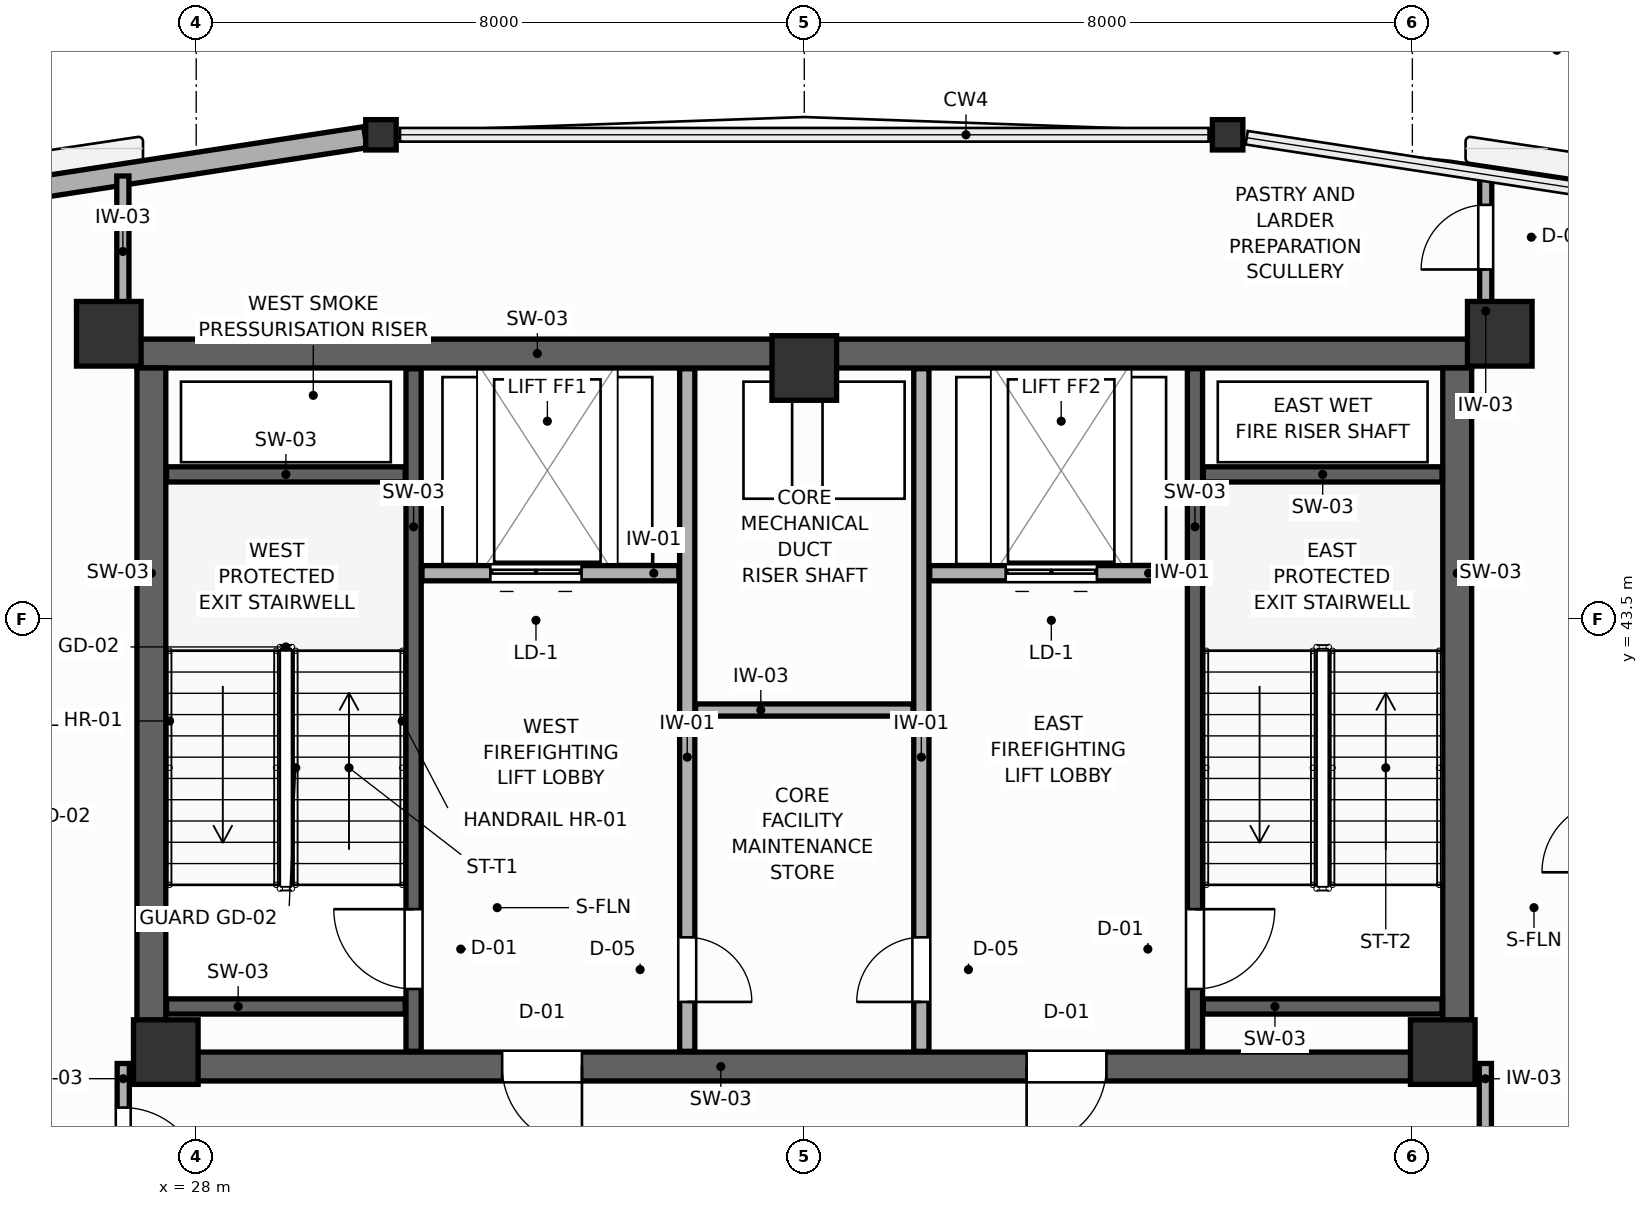
"""IFC4 building model, lengths in metres.
Left out: names, types, materials, properties, quantities, classifications, styles, units other than length and angle.
Written with IfcOpenShell. Run it as: python <this file> out.ifc"""

import sys

from ifc_helpers import new_model, si_unit, direction, frame, frame_2d, origin, origin_2d, place, context, subcontext, project, spatial, rectangle, i_section, extrude, source, transform, mapped, element, fill, save


model = new_model("IFC4")
c1 = context("Model", 3, precision=1e-05, world=origin(), true_north=direction((0.0, 1.0)))
c2 = subcontext(c1, "Body", "Model", "MODEL_VIEW")
j1 = project(units=[si_unit("LENGTHUNIT", "METRE"), si_unit("PLANEANGLEUNIT", "RADIAN")], contexts=[c1])
p1 = place(None, origin())
s1 = spatial("IfcSite", under=j1, at=p1, CompositionType="ELEMENT")
p2 = place(p1, origin())
s2 = spatial("IfcBuilding", under=s1, at=p2, CompositionType="ELEMENT")
p3 = place(p2, frame((0.0, 0.0, 279.6)))
s3 = spatial("IfcBuildingStorey", under=s2, at=p3, CompositionType="ELEMENT", Elevation=279.6)
p4 = place(p3, frame((27.22, 46.99, 0.0), z_axis=(0.0, 0.0, 1.0), x_axis=(1.0, 0.0, 0.0)))
e1 = element("IfcWall", 1, at=p4, inside=s3, PredefinedType="SHEAR", context=c2, shape_type="SweptSolid", body=[
    extrude(rectangle(XDim=17.56, YDim=0.38, at=frame_2d((8.78, 0.0))), origin(), (0.0, 0.0, 1.0), 4.2),
])
p5 = place(p3, frame((27.22, 37.61, 0.0), z_axis=(0.0, 0.0, 1.0), x_axis=(1.0, 0.0, 0.0)))
e2 = element("IfcWall", 2, at=p5, inside=s3, PredefinedType="SHEAR", context=c2, shape_type="SweptSolid", body=[
    extrude(rectangle(XDim=17.56, YDim=0.38, at=frame_2d((8.78, 0.0))), origin(), (0.0, 0.0, 1.0), 4.2),
])
p6 = place(p5, frame((4.805, 0.0, 0.0)))
e3 = element("IfcOpeningElement", 3, at=p6, cuts=e2, PredefinedType="OPENING", context=c2, shape_type="SweptSolid", body=[
    extrude(rectangle(XDim=1.05, YDim=2.1, at=frame_2d((0.525, 1.05))), frame((0.0, 0.2, 0.0), z_axis=(0.0, -1.0, 0.0), x_axis=(1.0, 0.0, 0.0)), (0.0, 0.0, 1.0), 0.4),
])
p7 = place(p5, frame((11.705, 0.0, 0.0)))
e4 = element("IfcOpeningElement", 4, at=p7, cuts=e2, PredefinedType="OPENING", context=c2, shape_type="SweptSolid", body=[
    extrude(rectangle(XDim=1.05, YDim=2.1, at=frame_2d((0.525, 1.05))), frame((0.0, 0.2, 0.0), z_axis=(0.0, -1.0, 0.0), x_axis=(1.0, 0.0, 0.0)), (0.0, 0.0, 1.0), 0.4),
])
for number, where, z_axis, x_axis in (
    (5, (27.41, 37.8, 0.0), (0.0, 0.0, 1.0), (0.0, 1.0, 0.0)),
    (6, (44.59, 37.8, 0.0), (0.0, 0.0, 1.0), (0.0, 1.0, 0.0)),
):
    element("IfcWall", number, at=place(p3, frame(where, z_axis=z_axis, x_axis=x_axis)), inside=s3, PredefinedType="SHEAR", context=c2, shape_type="SweptSolid", body=[
        extrude(rectangle(XDim=9.0, YDim=0.38, at=frame_2d((4.5, 0.0))), origin(), (0.0, 0.0, 1.0), 4.2),
    ])
m1 = source(origin(), c2, "Body", "SweptSolid", [
    extrude(rectangle(XDim=0.85, YDim=0.85, at=origin_2d()), origin(), (0.0, 0.0, 1.0), 4.2),
])
for number, where, z_axis, x_axis in (
    (7, (26.85, 47.25, 0.0), (0.0, 0.0, 1.0), (1.0, 0.0, 0.0)),
    (8, (45.15, 47.25, 0.0), (0.0, 0.0, 1.0), (1.0, 0.0, 0.0)),
    (9, (27.6, 37.8, 0.0), (0.0, 0.0, 1.0), (1.0, 0.0, 0.0)),
    (10, (44.4, 37.8, 0.0), (0.0, 0.0, 1.0), (1.0, 0.0, 0.0)),
    (11, (36.0, 46.8, 0.0), (0.0, 0.0, 1.0), (1.0, 0.0, 0.0)),
):
    element("IfcColumn", number, at=place(p3, frame(where, z_axis=z_axis, x_axis=x_axis)), inside=s3, PredefinedType="COLUMN", context=c2, shape_type="MappedRepresentation", body=[
        mapped(m1, transform((0.0, 0.0, 0.0), scale=1.0)),
    ])
m2 = source(origin(), c2, "Body", "SweptSolid", [
    extrude(i_section(OverallWidth=0.401, OverallDepth=0.399, WebThickness=0.022, FlangeThickness=0.036, FilletRadius=0.015, at=origin_2d()), origin(), (0.0, 0.0, 1.0), 4.2),
])
for number, where, z_axis, x_axis in (
    (12, (41.57, 49.868, 0.0), (0.0, 0.0, 1.0), (1.0, 0.0, 0.0)),
    (13, (30.43, 49.868, 0.0), (0.0, 0.0, 1.0), (1.0, 0.0, 0.0)),
):
    element("IfcColumn", number, at=place(p3, frame(where, z_axis=z_axis, x_axis=x_axis)), inside=s3, PredefinedType="COLUMN", context=c2, shape_type="MappedRepresentation", body=[
        mapped(m2, transform((0.0, 0.0, 0.0), scale=1.0)),
    ])
p8 = place(p3, frame((30.225, 49.836, 0.0), z_axis=(0.0, 0.0, 1.0), x_axis=(-0.988391650679, -0.151927432902, 0.0)))
e14 = element("IfcWall", 14, at=p8, inside=s3, PredefinedType="SOLIDWALL", context=c2, shape_type="SweptSolid", body=[
    extrude(rectangle(XDim=12.301, YDim=0.28, at=frame_2d((6.151, 0.0))), origin(), (0.0, 0.0, 1.0), 2.52),
])
p9 = place(p3, frame((30.86, 37.81, 0.0), z_axis=(0.0, 0.0, 1.0), x_axis=(0.0, 1.0, 0.0)))
e15 = element("IfcWall", 15, at=p9, inside=s3, PredefinedType="SHEAR", context=c2, shape_type="SweptSolid", body=[
    extrude(rectangle(XDim=8.98, YDim=0.2, at=frame_2d((4.49, 0.0))), origin(), (0.0, 0.0, 1.0), 4.2),
])
p10 = place(p9, frame((0.82, 0.0, 0.0)))
e16 = element("IfcOpeningElement", 16, at=p10, cuts=e15, PredefinedType="OPENING", context=c2, shape_type="SweptSolid", body=[
    extrude(rectangle(XDim=1.05, YDim=2.1, at=frame_2d((0.525, 1.05))), frame((0.0, 0.11, 0.0), z_axis=(0.0, -1.0, 0.0), x_axis=(1.0, 0.0, 0.0)), (0.0, 0.0, 1.0), 0.22),
])
for number, where, z_axis, x_axis in (
    (17, (27.61, 45.4, 0.0), (0.0, 0.0, 1.0), (1.0, 0.0, 0.0)),
    (18, (27.61, 38.4, 0.0), (0.0, 0.0, 1.0), (1.0, 0.0, 0.0)),
):
    element("IfcWall", number, at=place(p3, frame(where, z_axis=z_axis, x_axis=x_axis)), inside=s3, PredefinedType="SHEAR", context=c2, shape_type="SweptSolid", body=[
        extrude(rectangle(XDim=3.14, YDim=0.2, at=frame_2d((1.57, 0.0))), origin(), (0.0, 0.0, 1.0), 4.2),
    ])
p11 = place(p3, frame((41.14, 37.81, 0.0), z_axis=(0.0, 0.0, 1.0), x_axis=(0.0, 1.0, 0.0)))
e19 = element("IfcWall", 19, at=p11, inside=s3, PredefinedType="SHEAR", context=c2, shape_type="SweptSolid", body=[
    extrude(rectangle(XDim=8.98, YDim=0.2, at=frame_2d((4.49, 0.0))), origin(), (0.0, 0.0, 1.0), 4.2),
])
p12 = place(p11, frame((0.82, 0.0, 0.0)))
e20 = element("IfcOpeningElement", 20, at=p12, cuts=e19, PredefinedType="OPENING", context=c2, shape_type="SweptSolid", body=[
    extrude(rectangle(XDim=1.05, YDim=2.1, at=frame_2d((0.525, 1.05))), frame((0.0, 0.11, 0.0), z_axis=(0.0, -1.0, 0.0), x_axis=(1.0, 0.0, 0.0)), (0.0, 0.0, 1.0), 0.22),
])
for number, where, z_axis, x_axis in (
    (21, (41.25, 45.4, 0.0), (0.0, 0.0, 1.0), (1.0, 0.0, 0.0)),
    (22, (41.25, 38.4, 0.0), (0.0, 0.0, 1.0), (1.0, 0.0, 0.0)),
):
    element("IfcWall", number, at=place(p3, frame(where, z_axis=z_axis, x_axis=x_axis)), inside=s3, PredefinedType="SHEAR", context=c2, shape_type="SweptSolid", body=[
        extrude(rectangle(XDim=3.14, YDim=0.2, at=frame_2d((1.57, 0.0))), origin(), (0.0, 0.0, 1.0), 4.2),
    ])
p13 = place(p3, frame((30.97, 44.1, 0.0), z_axis=(0.0, 0.0, 1.0), x_axis=(1.0, 0.0, 0.0)))
e23 = element("IfcWall", 23, at=p13, inside=s3, PredefinedType="PARTITIONING", context=c2, shape_type="SweptSolid", body=[
    extrude(rectangle(XDim=3.38, YDim=0.2, at=frame_2d((1.69, 0.0))), origin(), (0.0, 0.0, 1.0), 3.96),
])
p14 = place(p13, frame((0.9, 0.0, 0.0)))
e24 = element("IfcOpeningElement", 24, at=p14, cuts=e23, PredefinedType="OPENING", context=c2, shape_type="SweptSolid", body=[
    extrude(rectangle(XDim=1.2, YDim=2.1, at=frame_2d((0.6, 1.05))), frame((0.0, 0.11, 0.0), z_axis=(0.0, -1.0, 0.0), x_axis=(1.0, 0.0, 0.0)), (0.0, 0.0, 1.0), 0.22),
])
p15 = place(p3, frame((37.65, 44.1, 0.0), z_axis=(0.0, 0.0, 1.0), x_axis=(1.0, 0.0, 0.0)))
e25 = element("IfcWall", 25, at=p15, inside=s3, PredefinedType="PARTITIONING", context=c2, shape_type="SweptSolid", body=[
    extrude(rectangle(XDim=3.38, YDim=0.2, at=frame_2d((1.69, 0.0))), origin(), (0.0, 0.0, 1.0), 3.96),
])
p16 = place(p15, frame((1.0, 0.0, 0.0)))
e26 = element("IfcOpeningElement", 26, at=p16, cuts=e25, PredefinedType="OPENING", context=c2, shape_type="SweptSolid", body=[
    extrude(rectangle(XDim=1.2, YDim=2.1, at=frame_2d((0.6, 1.05))), frame((0.0, 0.11, 0.0), z_axis=(0.0, -1.0, 0.0), x_axis=(1.0, 0.0, 0.0)), (0.0, 0.0, 1.0), 0.22),
])
p17 = place(p3, frame((34.46, 37.81, 0.0), z_axis=(0.0, 0.0, 1.0), x_axis=(0.0, 1.0, 0.0)))
e27 = element("IfcWall", 27, at=p17, inside=s3, PredefinedType="PARTITIONING", context=c2, shape_type="SweptSolid", body=[
    extrude(rectangle(XDim=8.98, YDim=0.2, at=frame_2d((4.49, 0.0))), origin(), (0.0, 0.0, 1.0), 3.96),
])
p18 = place(p17, frame((0.65, 0.0, 0.0)))
e28 = element("IfcOpeningElement", 28, at=p18, cuts=e27, PredefinedType="OPENING", context=c2, shape_type="SweptSolid", body=[
    extrude(rectangle(XDim=0.85, YDim=2.05, at=frame_2d((0.425, 1.025))), frame((0.0, 0.11, 0.0), z_axis=(0.0, -1.0, 0.0), x_axis=(1.0, 0.0, 0.0)), (0.0, 0.0, 1.0), 0.22),
])
p19 = place(p3, frame((37.54, 37.81, 0.0), z_axis=(0.0, 0.0, 1.0), x_axis=(0.0, 1.0, 0.0)))
e29 = element("IfcWall", 29, at=p19, inside=s3, PredefinedType="PARTITIONING", context=c2, shape_type="SweptSolid", body=[
    extrude(rectangle(XDim=8.98, YDim=0.2, at=frame_2d((4.49, 0.0))), origin(), (0.0, 0.0, 1.0), 3.96),
])
p20 = place(p19, frame((0.65, 0.0, 0.0)))
e30 = element("IfcOpeningElement", 30, at=p20, cuts=e29, PredefinedType="OPENING", context=c2, shape_type="SweptSolid", body=[
    extrude(rectangle(XDim=0.85, YDim=2.05, at=frame_2d((0.425, 1.025))), frame((0.0, 0.11, 0.0), z_axis=(0.0, -1.0, 0.0), x_axis=(1.0, 0.0, 0.0)), (0.0, 0.0, 1.0), 0.22),
])
p21 = place(p3, frame((34.57, 42.3, 0.0), z_axis=(0.0, 0.0, 1.0), x_axis=(1.0, 0.0, 0.0)))
e31 = element("IfcWall", 31, at=p21, inside=s3, PredefinedType="PARTITIONING", context=c2, shape_type="SweptSolid", body=[
    extrude(rectangle(XDim=2.86, YDim=0.16, at=frame_2d((1.43, 0.0))), origin(), (0.0, 0.0, 1.0), 3.96),
])
p22 = place(p3, frame((27.04, 35.54, 0.0), z_axis=(0.0, 0.0, 1.0), x_axis=(0.0, 1.0, 0.0)))
e32 = element("IfcWall", 32, at=p22, inside=s3, PredefinedType="PARTITIONING", context=c2, shape_type="SweptSolid", body=[
    extrude(rectangle(XDim=2.11, YDim=0.16, at=frame_2d((1.055, 0.0))), origin(), (0.0, 0.0, 1.0), 3.96),
])
p23 = place(p22, frame((0.48, 0.0, 0.0)))
e33 = element("IfcOpeningElement", 33, at=p23, cuts=e32, PredefinedType="OPENING", context=c2, shape_type="SweptSolid", body=[
    extrude(rectangle(XDim=1.05, YDim=2.1, at=frame_2d((0.525, 1.05))), frame((0.0, 0.09, 0.0), z_axis=(0.0, -1.0, 0.0), x_axis=(1.0, 0.0, 0.0)), (0.0, 0.0, 1.0), 0.18),
])
p24 = place(p3, frame((44.96, 35.0, 0.0), z_axis=(0.0, 0.0, 1.0), x_axis=(0.0, 1.0, 0.0)))
e34 = element("IfcWall", 34, at=p24, inside=s3, PredefinedType="PARTITIONING", context=c2, shape_type="SweptSolid", body=[
    extrude(rectangle(XDim=2.65, YDim=0.16, at=frame_2d((1.325, 0.0))), origin(), (0.0, 0.0, 1.0), 3.96),
])
p25 = place(p24, frame((0.75, 0.0, 0.0)))
e35 = element("IfcOpeningElement", 35, at=p25, cuts=e34, PredefinedType="OPENING", context=c2, shape_type="SweptSolid", body=[
    extrude(rectangle(XDim=1.05, YDim=2.1, at=frame_2d((0.525, 1.05))), frame((0.0, 0.09, 0.0), z_axis=(0.0, -1.0, 0.0), x_axis=(1.0, 0.0, 0.0)), (0.0, 0.0, 1.0), 0.18),
])
p26 = place(p3, frame((44.965, 47.18, 0.0), z_axis=(0.0, 0.0, 1.0), x_axis=(0.0, 1.0, 0.0)))
e36 = element("IfcWall", 36, at=p26, inside=s3, PredefinedType="PARTITIONING", context=c2, shape_type="SweptSolid", body=[
    extrude(rectangle(XDim=2.146, YDim=0.16, at=frame_2d((1.073, 0.0))), origin(), (0.0, 0.0, 1.0), 3.96),
])
p27 = place(p26, frame((0.916, 0.0, 0.0)))
e37 = element("IfcOpeningElement", 37, at=p27, cuts=e36, PredefinedType="OPENING", context=c2, shape_type="SweptSolid", body=[
    extrude(rectangle(XDim=0.85, YDim=2.05, at=frame_2d((0.425, 1.025))), frame((0.0, 0.09, 0.0), z_axis=(0.0, -1.0, 0.0), x_axis=(1.0, 0.0, 0.0)), (0.0, 0.0, 1.0), 0.18),
])
p28 = place(p3, frame((27.035, 47.34, 0.0), z_axis=(0.0, 0.0, 1.0), x_axis=(0.0, 1.0, 0.0)))
e38 = element("IfcWall", 38, at=p28, inside=s3, PredefinedType="PARTITIONING", context=c2, shape_type="SweptSolid", body=[
    extrude(rectangle(XDim=1.986, YDim=0.16, at=frame_2d((0.993, 0.0))), origin(), (0.0, 0.0, 1.0), 3.96),
])
p29 = place(p10, origin())
e39 = element("IfcDoor", 39, at=p29, inside=s3, OperationType="SINGLE_SWING_RIGHT", PredefinedType="DOOR", context=c2, shape_type="SweptSolid", body=[
    extrude(rectangle(XDim=1.05, YDim=2.1, at=frame_2d((0.525, 1.05))), frame((0.0, 0.025, 0.0), z_axis=(0.0, -1.0, 0.0), x_axis=(1.0, 0.0, 0.0)), (0.0, 0.0, 1.0), 0.05),
])
fill(e16, e39)
p30 = place(p12, frame((1.05, 0.0, 0.0), z_axis=(0.0, 0.0, 1.0), x_axis=(-1.0, 0.0, 0.0)))
e40 = element("IfcDoor", 40, at=p30, inside=s3, OperationType="SINGLE_SWING_LEFT", PredefinedType="DOOR", context=c2, shape_type="SweptSolid", body=[
    extrude(rectangle(XDim=1.05, YDim=2.1, at=frame_2d((0.525, 1.05))), frame((0.0, 0.025, 0.0), z_axis=(0.0, -1.0, 0.0), x_axis=(1.0, 0.0, 0.0)), (0.0, 0.0, 1.0), 0.05),
])
fill(e20, e40)
p31 = place(p14, origin())
e41 = element("IfcDoor", 41, at=p31, inside=s3, OperationType="DOUBLE_DOOR_SLIDING", PredefinedType="DOOR", context=c2, shape_type="SweptSolid", body=[
    extrude(rectangle(XDim=1.2, YDim=2.1, at=frame_2d((0.6, 1.05))), frame((0.0, 0.025, 0.0), z_axis=(0.0, -1.0, 0.0), x_axis=(1.0, 0.0, 0.0)), (0.0, 0.0, 1.0), 0.05),
])
fill(e24, e41)
p32 = place(p16, origin())
e42 = element("IfcDoor", 42, at=p32, inside=s3, OperationType="DOUBLE_DOOR_SLIDING", PredefinedType="DOOR", context=c2, shape_type="SweptSolid", body=[
    extrude(rectangle(XDim=1.2, YDim=2.1, at=frame_2d((0.6, 1.05))), frame((0.0, 0.025, 0.0), z_axis=(0.0, -1.0, 0.0), x_axis=(1.0, 0.0, 0.0)), (0.0, 0.0, 1.0), 0.05),
])
fill(e26, e42)
p33 = place(p18, frame((0.85, 0.0, 0.0), z_axis=(0.0, 0.0, 1.0), x_axis=(-1.0, 0.0, 0.0)))
e43 = element("IfcDoor", 43, at=p33, inside=s3, OperationType="SINGLE_SWING_RIGHT", PredefinedType="DOOR", context=c2, shape_type="SweptSolid", body=[
    extrude(rectangle(XDim=0.85, YDim=2.05, at=frame_2d((0.425, 1.025))), frame((0.0, 0.025, 0.0), z_axis=(0.0, -1.0, 0.0), x_axis=(1.0, 0.0, 0.0)), (0.0, 0.0, 1.0), 0.05),
])
fill(e28, e43)
p34 = place(p20, origin())
e44 = element("IfcDoor", 44, at=p34, inside=s3, OperationType="SINGLE_SWING_LEFT", PredefinedType="DOOR", context=c2, shape_type="SweptSolid", body=[
    extrude(rectangle(XDim=0.85, YDim=2.05, at=frame_2d((0.425, 1.025))), frame((0.0, 0.025, 0.0), z_axis=(0.0, -1.0, 0.0), x_axis=(1.0, 0.0, 0.0)), (0.0, 0.0, 1.0), 0.05),
])
fill(e30, e44)
p35 = place(p23, frame((1.05, 0.0, 0.0), z_axis=(0.0, 0.0, 1.0), x_axis=(-1.0, 0.0, 0.0)))
e45 = element("IfcDoor", 45, at=p35, inside=s3, OperationType="SINGLE_SWING_RIGHT", PredefinedType="DOOR", context=c2, shape_type="SweptSolid", body=[
    extrude(rectangle(XDim=1.05, YDim=2.1, at=frame_2d((0.525, 1.05))), frame((0.0, 0.025, 0.0), z_axis=(0.0, -1.0, 0.0), x_axis=(1.0, 0.0, 0.0)), (0.0, 0.0, 1.0), 0.05),
])
fill(e33, e45)
p36 = place(p27, origin())
e46 = element("IfcDoor", 46, at=p36, inside=s3, OperationType="SINGLE_SWING_LEFT", PredefinedType="DOOR", context=c2, shape_type="SweptSolid", body=[
    extrude(rectangle(XDim=0.85, YDim=2.05, at=frame_2d((0.425, 1.025))), frame((0.0, 0.025, 0.0), z_axis=(0.0, -1.0, 0.0), x_axis=(1.0, 0.0, 0.0)), (0.0, 0.0, 1.0), 0.05),
])
fill(e37, e46)
p37 = place(p6, frame((1.05, 0.0, 0.0), z_axis=(0.0, 0.0, 1.0), x_axis=(-1.0, 0.0, 0.0)))
e47 = element("IfcDoor", 47, at=p37, inside=s3, OperationType="SINGLE_SWING_LEFT", PredefinedType="DOOR", context=c2, shape_type="SweptSolid", body=[
    extrude(rectangle(XDim=1.05, YDim=2.1, at=frame_2d((0.525, 1.05))), frame((0.0, 0.025, 0.0), z_axis=(0.0, -1.0, 0.0), x_axis=(1.0, 0.0, 0.0)), (0.0, 0.0, 1.0), 0.05),
])
fill(e3, e47)
p38 = place(p7, frame((1.05, 0.0, 0.0), z_axis=(0.0, 0.0, 1.0), x_axis=(-1.0, 0.0, 0.0)))
e48 = element("IfcDoor", 48, at=p38, inside=s3, OperationType="SINGLE_SWING_RIGHT", PredefinedType="DOOR", context=c2, shape_type="SweptSolid", body=[
    extrude(rectangle(XDim=1.05, YDim=2.1, at=frame_2d((0.525, 1.05))), frame((0.0, 0.025, 0.0), z_axis=(0.0, -1.0, 0.0), x_axis=(1.0, 0.0, 0.0)), (0.0, 0.0, 1.0), 0.05),
])
fill(e4, e48)
save(model, sys.argv[1])
